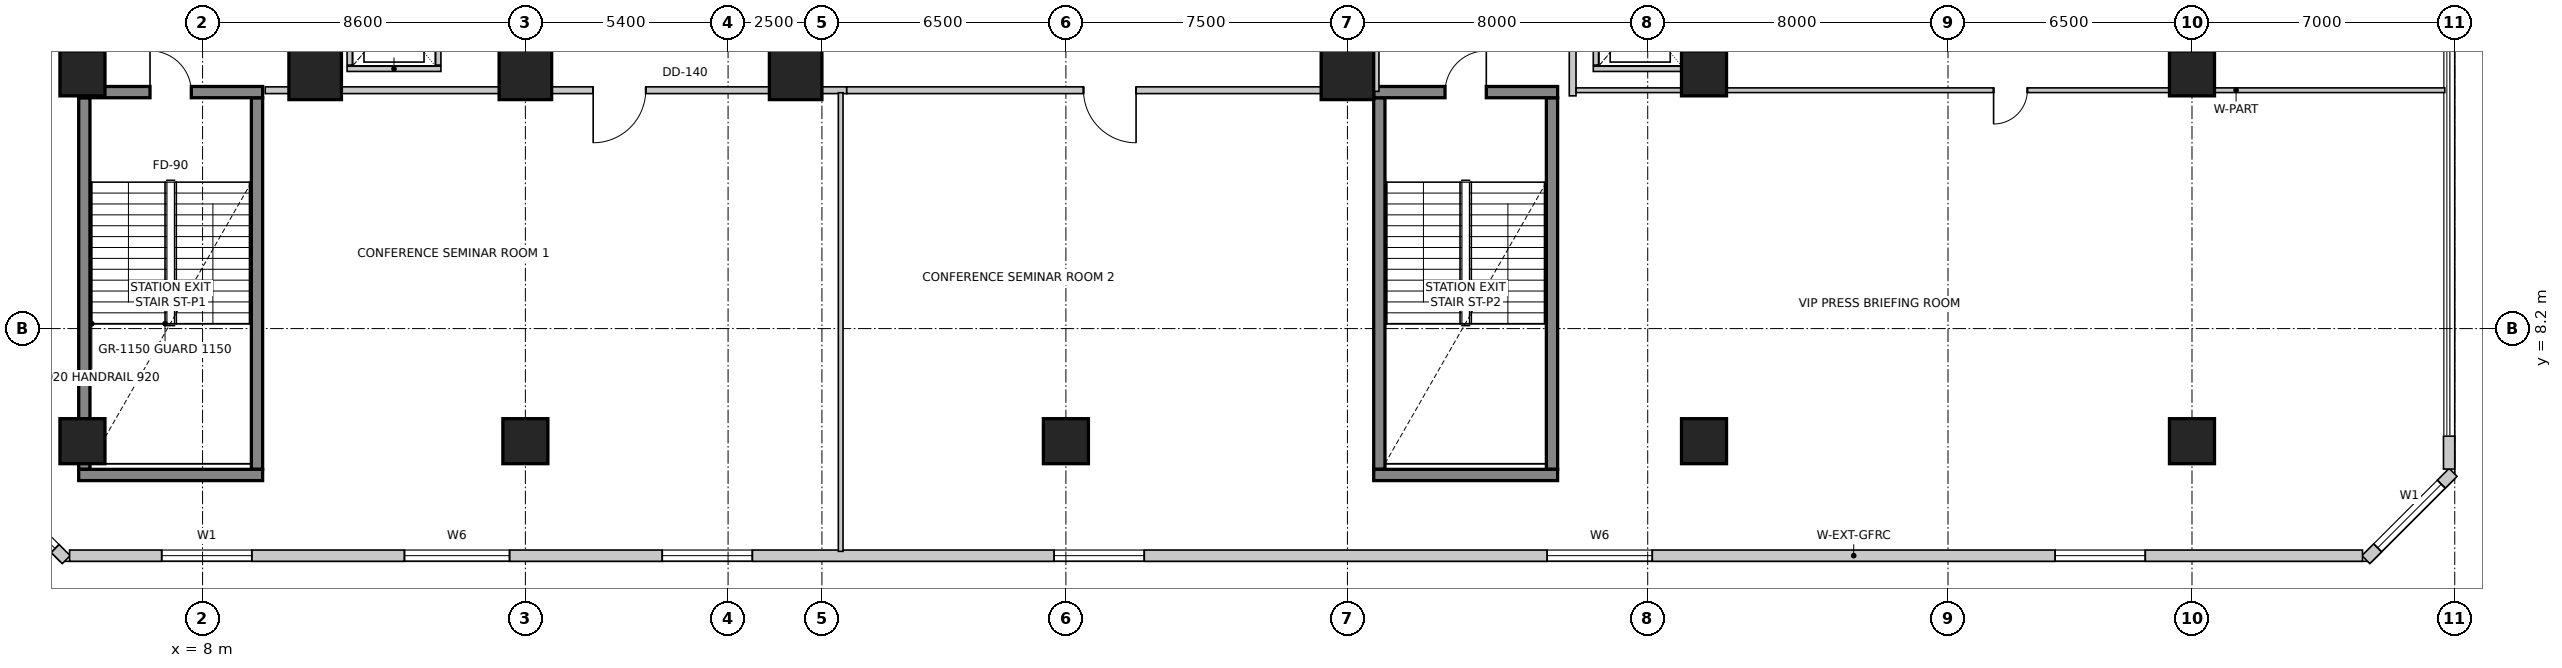
"""IFC4 building model, lengths in metres.
Left out: names, types, materials, properties, quantities, classifications, styles, units other than length and angle.
Written with IfcOpenShell. Run it as: python <this file> out.ifc"""

import sys

from ifc_helpers import new_model, si_unit, direction, frame, frame_2d, origin, origin_2d, place, context, subcontext, project, spatial, rectangle, extrude, source, transform, mapped, element, fill, save


model = new_model("IFC4")
c1 = context("Model", 3, precision=1e-05, world=origin(), true_north=direction((0.0, 1.0)))
c2 = subcontext(c1, "Body", "Model", "MODEL_VIEW")
j1 = project(units=[si_unit("LENGTHUNIT", "METRE"), si_unit("PLANEANGLEUNIT", "RADIAN")], contexts=[c1])
p1 = place(None, origin())
s1 = spatial("IfcSite", under=j1, at=p1, CompositionType="ELEMENT")
p2 = place(p1, origin())
s2 = spatial("IfcBuilding", under=s1, at=p2, CompositionType="ELEMENT")
p3 = place(p2, frame((0.0, 0.0, 11.2)))
s3 = spatial("IfcBuildingStorey", under=s2, at=p3, CompositionType="ELEMENT", Elevation=11.2)
for number, where, z_axis, x_axis in (
    (1, (4.85, 4.45, 0.0), (0.0, 0.0, 1.0), (0.0, 1.0, 0.0)),
    (2, (9.45, 4.45, 0.0), (0.0, 0.0, 1.0), (0.0, 1.0, 0.0)),
):
    element("IfcWall", number, at=place(p3, frame(where, z_axis=z_axis, x_axis=x_axis)), inside=s3, PredefinedType="SHEAR", context=c2, shape_type="SweptSolid", body=[
        extrude(rectangle(XDim=9.9, YDim=0.3, at=frame_2d((4.95, 0.0))), origin(), (0.0, 0.0, 1.0), 5.2),
    ])
p4 = place(p3, frame((4.7, 4.3, 0.0), z_axis=(0.0, 0.0, 1.0), x_axis=(1.0, 0.0, 0.0)))
e3 = element("IfcWall", 3, at=p4, inside=s3, PredefinedType="SHEAR", context=c2, shape_type="SweptSolid", body=[
    extrude(rectangle(XDim=4.9, YDim=0.3, at=frame_2d((2.45, 0.0))), origin(), (0.0, 0.0, 1.0), 5.2),
])
p5 = place(p3, frame((4.7, 14.5, 0.0), z_axis=(0.0, 0.0, 1.0), x_axis=(1.0, 0.0, 0.0)))
e4 = element("IfcWall", 4, at=p5, inside=s3, PredefinedType="SHEAR", context=c2, shape_type="SweptSolid", body=[
    extrude(rectangle(XDim=4.9, YDim=0.3, at=frame_2d((2.45, 0.0))), origin(), (0.0, 0.0, 1.0), 5.2),
])
m1 = source(origin(), c2, "Body", "SweptSolid", [
    extrude(rectangle(XDim=1.1, YDim=2.15, at=frame_2d((0.55, 1.075))), frame((0.0, 0.16, 0.0), z_axis=(0.0, -1.0, 0.0), x_axis=(1.0, 0.0, 0.0)), (0.0, 0.0, 1.0), 0.32),
])
p6 = place(p5, frame((1.9, 0.0, 0.0)))
e5 = element("IfcOpeningElement", 5, at=p6, cuts=e4, PredefinedType="OPENING", context=c2, shape_type="MappedRepresentation", body=[
    mapped(m1, transform((0.0, 0.0, 0.0), scale=1.0)),
])
for number, where, z_axis, x_axis in (
    (6, (39.35, 4.45, 0.0), (0.0, 0.0, 1.0), (0.0, 1.0, 0.0)),
    (7, (43.95, 4.45, 0.0), (0.0, 0.0, 1.0), (0.0, 1.0, 0.0)),
):
    element("IfcWall", number, at=place(p3, frame(where, z_axis=z_axis, x_axis=x_axis)), inside=s3, PredefinedType="SHEAR", context=c2, shape_type="SweptSolid", body=[
        extrude(rectangle(XDim=9.9, YDim=0.3, at=frame_2d((4.95, 0.0))), origin(), (0.0, 0.0, 1.0), 5.2),
    ])
p7 = place(p3, frame((39.2, 4.3, 0.0), z_axis=(0.0, 0.0, 1.0), x_axis=(1.0, 0.0, 0.0)))
e8 = element("IfcWall", 8, at=p7, inside=s3, PredefinedType="SHEAR", context=c2, shape_type="SweptSolid", body=[
    extrude(rectangle(XDim=4.9, YDim=0.3, at=frame_2d((2.45, 0.0))), origin(), (0.0, 0.0, 1.0), 5.2),
])
p8 = place(p3, frame((39.2, 14.5, 0.0), z_axis=(0.0, 0.0, 1.0), x_axis=(1.0, 0.0, 0.0)))
e9 = element("IfcWall", 9, at=p8, inside=s3, PredefinedType="SHEAR", context=c2, shape_type="SweptSolid", body=[
    extrude(rectangle(XDim=4.9, YDim=0.3, at=frame_2d((2.45, 0.0))), origin(), (0.0, 0.0, 1.0), 5.2),
])
p9 = place(p8, frame((1.9, 0.0, 0.0)))
e10 = element("IfcOpeningElement", 10, at=p9, cuts=e9, PredefinedType="OPENING", context=c2, shape_type="MappedRepresentation", body=[
    mapped(m1, transform((0.0, 0.0, 0.0), scale=1.0)),
])
m2 = source(origin(), c2, "Body", "SweptSolid", [
    extrude(rectangle(XDim=1.2, YDim=1.2, at=origin_2d()), origin(), (0.0, 0.0, 1.0), 5.2),
])
for number, where, z_axis, x_axis in (
    (11, (4.8, 5.2, 0.0), (0.0, 0.0, 1.0), (1.0, 0.0, 0.0)),
    (12, (16.6, 5.2, 0.0), (0.0, 0.0, 1.0), (1.0, 0.0, 0.0)),
    (13, (31.0, 5.2, 0.0), (0.0, 0.0, 1.0), (1.0, 0.0, 0.0)),
    (14, (48.0, 5.2, 0.0), (0.0, 0.0, 1.0), (1.0, 0.0, 0.0)),
    (15, (61.0, 5.2, 0.0), (0.0, 0.0, 1.0), (1.0, 0.0, 0.0)),
    (16, (4.8, 15.0, 0.0), (0.0, 0.0, 1.0), (1.0, 0.0, 0.0)),
):
    element("IfcColumn", number, at=place(p3, frame(where, z_axis=z_axis, x_axis=x_axis)), inside=s3, PredefinedType="COLUMN", context=c2, shape_type="MappedRepresentation", body=[
        mapped(m2, transform((0.0, 0.0, 0.0), scale=1.0)),
    ])
m3 = source(origin(), c2, "Body", "SweptSolid", [
    extrude(rectangle(XDim=1.4, YDim=1.4, at=origin_2d()), origin(), (0.0, 0.0, 1.0), 5.2),
])
for number, where, z_axis, x_axis in (
    (17, (11.0, 15.0, 0.0), (0.0, 0.0, 1.0), (1.0, 0.0, 0.0)),
    (18, (16.6, 15.0, 0.0), (0.0, 0.0, 1.0), (1.0, 0.0, 0.0)),
    (19, (23.8, 15.0, 0.0), (0.0, 0.0, 1.0), (1.0, 0.0, 0.0)),
    (20, (38.5, 15.0, 0.0), (0.0, 0.0, 1.0), (1.0, 0.0, 0.0)),
):
    element("IfcColumn", number, at=place(p3, frame(where, z_axis=z_axis, x_axis=x_axis)), inside=s3, PredefinedType="COLUMN", context=c2, shape_type="MappedRepresentation", body=[
        mapped(m3, transform((0.0, 0.0, 0.0), scale=1.0)),
    ])
for number, where, z_axis, x_axis in (
    (21, (48.0, 15.0, 0.0), (0.0, 0.0, 1.0), (1.0, 0.0, 0.0)),
    (22, (61.0, 15.0, 0.0), (0.0, 0.0, 1.0), (1.0, 0.0, 0.0)),
):
    element("IfcColumn", number, at=place(p3, frame(where, z_axis=z_axis, x_axis=x_axis)), inside=s3, PredefinedType="COLUMN", context=c2, shape_type="MappedRepresentation", body=[
        mapped(m2, transform((0.0, 0.0, 0.0), scale=1.0)),
    ])
p10 = place(p3, frame((65.632, 2.044, 0.0), z_axis=(0.0, 0.0, 1.0), x_axis=(0.707106781187, 0.707106781187, 0.0)))
e23 = element("IfcWall", 23, at=p10, inside=s3, PredefinedType="SOLIDWALL", context=c2, shape_type="SweptSolid", body=[
    extrude(rectangle(XDim=3.287, YDim=0.3, at=frame_2d((1.644, 0.0))), origin(), (0.0, 0.0, 1.0), 4.9),
])
m4 = source(origin(), c2, "Body", "SweptSolid", [
    extrude(rectangle(XDim=2.4, YDim=2.2, at=frame_2d((1.2, 1.1))), frame((0.0, 0.16, 0.0), z_axis=(0.0, -1.0, 0.0), x_axis=(1.0, 0.0, 0.0)), (0.0, 0.0, 1.0), 0.32),
])
p11 = place(p10, frame((0.444, 0.0, 0.85)))
e24 = element("IfcOpeningElement", 24, at=p11, cuts=e23, PredefinedType="OPENING", context=c2, shape_type="MappedRepresentation", body=[
    mapped(m4, transform((0.0, 0.0, 0.0), scale=1.0)),
])
p12 = place(p3, frame((67.85, 4.457, 0.0), z_axis=(0.0, 0.0, 1.0), x_axis=(0.0, 1.0, 0.0)))
e25 = element("IfcWall", 25, at=p12, inside=s3, PredefinedType="SOLIDWALL", context=c2, shape_type="SweptSolid", body=[
    extrude(rectangle(XDim=0.877, YDim=0.3, at=frame_2d((0.439, 0.0))), origin(), (0.0, 0.0, 1.0), 4.9),
])
p13 = place(p3, frame((2.288, 4.124, 0.0), z_axis=(0.0, 0.0, 1.0), x_axis=(0.707106781187, -0.707106781187, 0.0)))
e26 = element("IfcWall", 26, at=p13, inside=s3, PredefinedType="SOLIDWALL", context=c2, shape_type="SweptSolid", body=[
    extrude(rectangle(XDim=2.942, YDim=0.3, at=frame_2d((1.471, 0.0))), origin(), (0.0, 0.0, 1.0), 4.9),
])
m5 = source(origin(), c2, "Body", "SweptSolid", [
    extrude(rectangle(XDim=2.1, YDim=2.0, at=frame_2d((1.05, 1.0))), frame((0.0, 0.16, 0.0), z_axis=(0.0, -1.0, 0.0), x_axis=(1.0, 0.0, 0.0)), (0.0, 0.0, 1.0), 0.32),
])
p14 = place(p13, frame((0.421, 0.0, 0.85)))
e27 = element("IfcOpeningElement", 27, at=p14, cuts=e26, PredefinedType="OPENING", context=c2, shape_type="MappedRepresentation", body=[
    mapped(m5, transform((0.0, 0.0, 0.0), scale=1.0)),
])
p15 = place(p3, frame((4.457, 2.15, 0.0), z_axis=(0.0, 0.0, 1.0), x_axis=(1.0, 0.0, 0.0)))
e28 = element("IfcWall", 28, at=p15, inside=s3, PredefinedType="SOLIDWALL", context=c2, shape_type="SweptSolid", body=[
    extrude(rectangle(XDim=61.085, YDim=0.3, at=frame_2d((30.543, 0.0))), origin(), (0.0, 0.0, 1.0), 4.9),
])
p16 = place(p15, frame((2.454, 0.0, 0.85)))
e29 = element("IfcOpeningElement", 29, at=p16, cuts=e28, PredefinedType="OPENING", context=c2, shape_type="MappedRepresentation", body=[
    mapped(m4, transform((0.0, 0.0, 0.0), scale=1.0)),
])
m6 = source(origin(), c2, "Body", "SweptSolid", [
    extrude(rectangle(XDim=2.8, YDim=2.4, at=frame_2d((1.4, 1.2))), frame((0.0, 0.16, 0.0), z_axis=(0.0, -1.0, 0.0), x_axis=(1.0, 0.0, 0.0)), (0.0, 0.0, 1.0), 0.32),
])
p17 = place(p15, frame((8.921, 0.0, 0.85)))
e30 = element("IfcOpeningElement", 30, at=p17, cuts=e28, PredefinedType="OPENING", context=c2, shape_type="MappedRepresentation", body=[
    mapped(m6, transform((0.0, 0.0, 0.0), scale=1.0)),
])
p18 = place(p15, frame((15.789, 0.0, 0.85)))
e31 = element("IfcOpeningElement", 31, at=p18, cuts=e28, PredefinedType="OPENING", context=c2, shape_type="MappedRepresentation", body=[
    mapped(m4, transform((0.0, 0.0, 0.0), scale=1.0)),
])
p19 = place(p15, frame((26.23, 0.0, 0.85)))
e32 = element("IfcOpeningElement", 32, at=p19, cuts=e28, PredefinedType="OPENING", context=c2, shape_type="MappedRepresentation", body=[
    mapped(m4, transform((0.0, 0.0, 0.0), scale=1.0)),
])
p20 = place(p15, frame((39.364, 0.0, 0.85)))
e33 = element("IfcOpeningElement", 33, at=p20, cuts=e28, PredefinedType="OPENING", context=c2, shape_type="MappedRepresentation", body=[
    mapped(m6, transform((0.0, 0.0, 0.0), scale=1.0)),
])
p21 = place(p15, frame((52.898, 0.0, 0.85)))
e34 = element("IfcOpeningElement", 34, at=p21, cuts=e28, PredefinedType="OPENING", context=c2, shape_type="MappedRepresentation", body=[
    mapped(m4, transform((0.0, 0.0, 0.0), scale=1.0)),
])
p22 = place(p3, frame((11.85, 15.12, 0.0), z_axis=(0.0, 0.0, 1.0), x_axis=(1.0, 0.0, 0.0)))
e35 = element("IfcWall", 35, at=p22, inside=s3, PredefinedType="SOLIDWALL", context=c2, shape_type="SweptSolid", body=[
    extrude(rectangle(XDim=2.5, YDim=0.14, at=frame_2d((1.25, 0.0))), origin(), (0.0, 0.0, 1.0), 3.692),
])
for number, where, z_axis, x_axis in (
    (36, (11.92, 15.22, 0.0), (0.0, 0.0, 1.0), (0.0, 1.0, 0.0)),
    (37, (14.28, 15.22, 0.0), (0.0, 0.0, 1.0), (0.0, 1.0, 0.0)),
):
    element("IfcWall", number, at=place(p3, frame(where, z_axis=z_axis, x_axis=x_axis)), inside=s3, PredefinedType="SOLIDWALL", context=c2, shape_type="SweptSolid", body=[
        extrude(rectangle(XDim=2.56, YDim=0.14, at=frame_2d((1.28, 0.0))), origin(), (0.0, 0.0, 1.0), 3.692),
    ])
p23 = place(p3, frame((45.05, 15.12, 0.0), z_axis=(0.0, 0.0, 1.0), x_axis=(1.0, 0.0, 0.0)))
e38 = element("IfcWall", 38, at=p23, inside=s3, PredefinedType="SOLIDWALL", context=c2, shape_type="SweptSolid", body=[
    extrude(rectangle(XDim=2.5, YDim=0.14, at=frame_2d((1.25, 0.0))), origin(), (0.0, 0.0, 1.0), 3.692),
])
p24 = place(p3, frame((45.12, 15.22, 0.0), z_axis=(0.0, 0.0, 1.0), x_axis=(0.0, 1.0, 0.0)))
e39 = element("IfcWall", 39, at=p24, inside=s3, PredefinedType="SOLIDWALL", context=c2, shape_type="SweptSolid", body=[
    extrude(rectangle(XDim=2.56, YDim=0.14, at=frame_2d((1.28, 0.0))), origin(), (0.0, 0.0, 1.0), 3.692),
])
p25 = place(p3, frame((47.48, 15.22, 0.0), z_axis=(0.0, 0.0, 1.0), x_axis=(0.0, 1.0, 0.0)))
e40 = element("IfcWall", 40, at=p25, inside=s3, PredefinedType="SOLIDWALL", context=c2, shape_type="SweptSolid", body=[
    extrude(rectangle(XDim=2.56, YDim=0.14, at=frame_2d((1.28, 0.0))), origin(), (0.0, 0.0, 1.0), 3.092),
])
p26 = place(p3, frame((39.25, 14.52, 0.0), z_axis=(0.0, 0.0, 1.0), x_axis=(0.0, 1.0, 0.0)))
e41 = element("IfcWall", 41, at=p26, inside=s3, PredefinedType="PARTITIONING", context=c2, shape_type="SweptSolid", body=[
    extrude(rectangle(XDim=14.886, YDim=0.18, at=frame_2d((7.443, 0.0))), origin(), (0.0, 0.0, 1.0), 3.692),
])
p27 = place(p3, frame((44.5, 29.406, 0.0), z_axis=(0.0, 0.0, 1.0), x_axis=(0.0, -1.0, 0.0)))
e42 = element("IfcWall", 42, at=p27, inside=s3, PredefinedType="PARTITIONING", context=c2, shape_type="SweptSolid", body=[
    extrude(rectangle(XDim=15.006, YDim=0.18, at=frame_2d((7.503, 0.0))), origin(), (0.0, 0.0, 1.0), 3.692),
])
p28 = place(p3, frame((25.16, 14.55, 0.0), z_axis=(0.0, 0.0, 1.0), x_axis=(-1.0, 0.0, 0.0)))
e43 = element("IfcWall", 43, at=p28, inside=s3, PredefinedType="PARTITIONING", context=c2, shape_type="SweptSolid", body=[
    extrude(rectangle(XDim=15.49, YDim=0.18, at=frame_2d((7.745, 0.0))), origin(), (0.0, 0.0, 1.0), 3.942),
])
m7 = source(origin(), c2, "Body", "SweptSolid", [
    extrude(rectangle(XDim=1.4, YDim=2.15, at=frame_2d((0.7, 1.075))), frame((0.0, 0.1, 0.0), z_axis=(0.0, -1.0, 0.0), x_axis=(1.0, 0.0, 0.0)), (0.0, 0.0, 1.0), 0.2),
])
p29 = place(p28, frame((5.354, 0.0, 0.0)))
e44 = element("IfcOpeningElement", 44, at=p29, cuts=e43, PredefinedType="OPENING", context=c2, shape_type="MappedRepresentation", body=[
    mapped(m7, transform((0.0, 0.0, 0.0), scale=1.0)),
])
p30 = place(p3, frame((39.056, 14.55, 0.0), z_axis=(0.0, 0.0, 1.0), x_axis=(-1.0, 0.0, 0.0)))
e45 = element("IfcWall", 45, at=p30, inside=s3, PredefinedType="PARTITIONING", context=c2, shape_type="SweptSolid", body=[
    extrude(rectangle(XDim=13.894, YDim=0.18, at=frame_2d((6.947, 0.0))), origin(), (0.0, 0.0, 1.0), 4.485),
])
p31 = place(p30, frame((6.187, 0.0, 0.0)))
e46 = element("IfcOpeningElement", 46, at=p31, cuts=e45, PredefinedType="OPENING", context=c2, shape_type="MappedRepresentation", body=[
    mapped(m7, transform((0.0, 0.0, 0.0), scale=1.0)),
])
p32 = place(p3, frame((67.735, 14.55, 0.0), z_axis=(0.0, 0.0, 1.0), x_axis=(-1.0, 0.0, 0.0)))
e47 = element("IfcWall", 47, at=p32, inside=s3, PredefinedType="PARTITIONING", context=c2, shape_type="SweptSolid", body=[
    extrude(rectangle(XDim=23.141, YDim=0.125, at=frame_2d((11.571, 0.0))), origin(), (0.0, 0.0, 1.0), 3.942),
])
m8 = source(origin(), c2, "Body", "SweptSolid", [
    extrude(rectangle(XDim=0.9, YDim=2.15, at=frame_2d((0.45, 1.075))), frame((0.0, 0.073, 0.0), z_axis=(0.0, -1.0, 0.0), x_axis=(1.0, 0.0, 0.0)), (0.0, 0.0, 1.0), 0.145),
])
p33 = place(p32, frame((11.121, 0.0, 0.0)))
e48 = element("IfcOpeningElement", 48, at=p33, cuts=e47, PredefinedType="OPENING", context=c2, shape_type="MappedRepresentation", body=[
    mapped(m8, transform((0.0, 0.0, 0.0), scale=1.0)),
])
p34 = place(p3, frame((25.0, 14.483, 0.0), z_axis=(0.0, 0.0, 1.0), x_axis=(0.0, -1.0, 0.0)))
e49 = element("IfcWall", 49, at=p34, inside=s3, PredefinedType="PARTITIONING", context=c2, shape_type="SweptSolid", body=[
    extrude(rectangle(XDim=12.219, YDim=0.125, at=frame_2d((6.109, 0.0))), origin(), (0.0, 0.0, 1.0), 3.692),
])
m9 = source(origin(), c2, "Body", "SweptSolid", [
    extrude(rectangle(XDim=2.4, YDim=2.2, at=frame_2d((1.2, 1.1))), frame((0.0, -0.015, 0.0), z_axis=(0.0, -1.0, 0.0), x_axis=(1.0, 0.0, 0.0)), (0.0, 0.0, 1.0), 0.06),
])
p35 = place(p11, origin())
e50 = element("IfcWindow", 50, at=p35, inside=s3, PartitioningType="SINGLE_PANEL", PredefinedType="WINDOW", context=c2, shape_type="MappedRepresentation", body=[
    mapped(m9, transform((0.0, 0.0, 0.0), scale=1.0)),
])
fill(e24, e50)
m10 = source(origin(), c2, "Body", "SweptSolid", [
    extrude(rectangle(XDim=2.1, YDim=2.0, at=frame_2d((1.05, 1.0))), frame((0.0, -0.015, 0.0), z_axis=(0.0, -1.0, 0.0), x_axis=(1.0, 0.0, 0.0)), (0.0, 0.0, 1.0), 0.06),
])
p36 = place(p14, origin())
e51 = element("IfcWindow", 51, at=p36, inside=s3, PartitioningType="SINGLE_PANEL", PredefinedType="WINDOW", context=c2, shape_type="MappedRepresentation", body=[
    mapped(m10, transform((0.0, 0.0, 0.0), scale=1.0)),
])
fill(e27, e51)
p37 = place(p16, origin())
e52 = element("IfcWindow", 52, at=p37, inside=s3, PartitioningType="SINGLE_PANEL", PredefinedType="WINDOW", context=c2, shape_type="MappedRepresentation", body=[
    mapped(m9, transform((0.0, 0.0, 0.0), scale=1.0)),
])
fill(e29, e52)
m11 = source(origin(), c2, "Body", "SweptSolid", [
    extrude(rectangle(XDim=2.8, YDim=2.4, at=frame_2d((1.4, 1.2))), frame((0.0, -0.015, 0.0), z_axis=(0.0, -1.0, 0.0), x_axis=(1.0, 0.0, 0.0)), (0.0, 0.0, 1.0), 0.06),
])
p38 = place(p17, origin())
e53 = element("IfcWindow", 53, at=p38, inside=s3, PartitioningType="SINGLE_PANEL", PredefinedType="WINDOW", context=c2, shape_type="MappedRepresentation", body=[
    mapped(m11, transform((0.0, 0.0, 0.0), scale=1.0)),
])
fill(e30, e53)
p39 = place(p18, origin())
e54 = element("IfcWindow", 54, at=p39, inside=s3, PartitioningType="SINGLE_PANEL", PredefinedType="WINDOW", context=c2, shape_type="MappedRepresentation", body=[
    mapped(m9, transform((0.0, 0.0, 0.0), scale=1.0)),
])
fill(e31, e54)
p40 = place(p19, origin())
e55 = element("IfcWindow", 55, at=p40, inside=s3, PartitioningType="SINGLE_PANEL", PredefinedType="WINDOW", context=c2, shape_type="MappedRepresentation", body=[
    mapped(m9, transform((0.0, 0.0, 0.0), scale=1.0)),
])
fill(e32, e55)
p41 = place(p20, origin())
e56 = element("IfcWindow", 56, at=p41, inside=s3, PartitioningType="SINGLE_PANEL", PredefinedType="WINDOW", context=c2, shape_type="MappedRepresentation", body=[
    mapped(m11, transform((0.0, 0.0, 0.0), scale=1.0)),
])
fill(e33, e56)
p42 = place(p21, origin())
e57 = element("IfcWindow", 57, at=p42, inside=s3, PartitioningType="SINGLE_PANEL", PredefinedType="WINDOW", context=c2, shape_type="MappedRepresentation", body=[
    mapped(m9, transform((0.0, 0.0, 0.0), scale=1.0)),
])
fill(e34, e57)
m12 = source(origin(), c2, "Body", "SweptSolid", [
    extrude(rectangle(XDim=1.1, YDim=2.15, at=frame_2d((0.55, 1.075))), frame((0.0, 0.025, 0.0), z_axis=(0.0, -1.0, 0.0), x_axis=(1.0, 0.0, 0.0)), (0.0, 0.0, 1.0), 0.05),
])
p43 = place(p6, origin())
e58 = element("IfcDoor", 58, at=p43, inside=s3, OperationType="SINGLE_SWING_LEFT", PredefinedType="DOOR", context=c2, shape_type="MappedRepresentation", body=[
    mapped(m12, transform((0.0, 0.0, 0.0), scale=1.0)),
])
fill(e5, e58)
p44 = place(p9, origin())
e59 = element("IfcDoor", 59, at=p44, inside=s3, OperationType="SINGLE_SWING_RIGHT", PredefinedType="DOOR", context=c2, shape_type="MappedRepresentation", body=[
    mapped(m12, transform((0.0, 0.0, 0.0), scale=1.0)),
])
fill(e10, e59)
m13 = source(origin(), c2, "Body", "SweptSolid", [
    extrude(rectangle(XDim=1.4, YDim=2.15, at=frame_2d((0.7, 1.075))), frame((0.0, 0.025, 0.0), z_axis=(0.0, -1.0, 0.0), x_axis=(1.0, 0.0, 0.0)), (0.0, 0.0, 1.0), 0.05),
])
p45 = place(p29, origin())
e60 = element("IfcDoor", 60, at=p45, inside=s3, OperationType="SINGLE_SWING_RIGHT", PredefinedType="DOOR", context=c2, shape_type="MappedRepresentation", body=[
    mapped(m13, transform((0.0, 0.0, 0.0), scale=1.0)),
])
fill(e44, e60)
p46 = place(p31, origin())
e61 = element("IfcDoor", 61, at=p46, inside=s3, OperationType="SINGLE_SWING_LEFT", PredefinedType="DOOR", context=c2, shape_type="MappedRepresentation", body=[
    mapped(m13, transform((0.0, 0.0, 0.0), scale=1.0)),
])
fill(e46, e61)
m14 = source(origin(), c2, "Body", "SweptSolid", [
    extrude(rectangle(XDim=0.9, YDim=2.15, at=frame_2d((0.45, 1.075))), frame((0.0, 0.025, 0.0), z_axis=(0.0, -1.0, 0.0), x_axis=(1.0, 0.0, 0.0)), (0.0, 0.0, 1.0), 0.05),
])
p47 = place(p33, origin())
e62 = element("IfcDoor", 62, at=p47, inside=s3, OperationType="SINGLE_SWING_RIGHT", PredefinedType="DOOR", context=c2, shape_type="MappedRepresentation", body=[
    mapped(m14, transform((0.0, 0.0, 0.0), scale=1.0)),
])
fill(e48, e62)
save(model, sys.argv[1])
